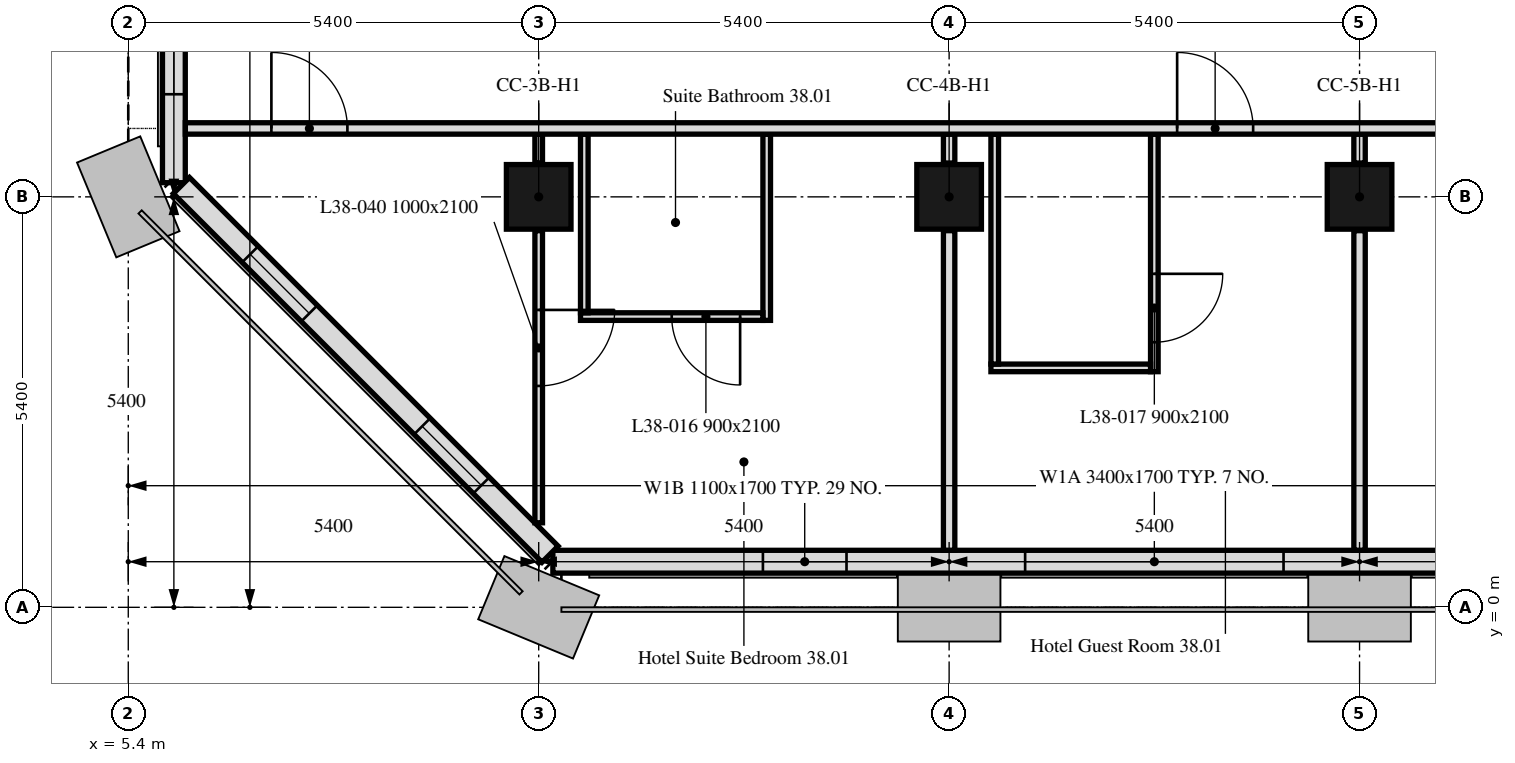
"""IFC4 building model, lengths in metres.
Left out: names, types, materials, properties, quantities, classifications, styles, units other than length and angle.
Written with IfcOpenShell. Run it as: python <this file> out.ifc"""

import sys

from ifc_helpers import new_model, si_unit, direction, frame, frame_2d, origin, origin_2d, place, context, subcontext, project, spatial, rectangle, extrude, element, fill, save


model = new_model("IFC4")
c1 = context("Model", 3, precision=1e-05, world=origin(), true_north=direction((0.0, 1.0)))
c2 = subcontext(c1, "Body", "Model", "MODEL_VIEW")
j1 = project(units=[si_unit("LENGTHUNIT", "METRE"), si_unit("PLANEANGLEUNIT", "RADIAN")], contexts=[c1])
p1 = place(None, origin())
s1 = spatial("IfcSite", under=j1, at=p1, CompositionType="ELEMENT")
p2 = place(p1, origin())
s2 = spatial("IfcBuilding", under=s1, at=p2, CompositionType="ELEMENT")
p3 = place(p2, frame((0.0, 0.0, 162.7)))
s3 = spatial("IfcBuildingStorey", under=s2, at=p3, CompositionType="ELEMENT", Elevation=162.7)
for number, where, z_axis, x_axis in (
    (1, (10.8, 5.4, 0.0), (0.0, 0.0, 1.0), (1.0, 0.0, 0.0)),
    (2, (16.2, 5.4, 0.0), (0.0, 0.0, 1.0), (1.0, 0.0, 0.0)),
    (3, (21.6, 5.4, 0.0), (0.0, 0.0, 1.0), (1.0, 0.0, 0.0)),
):
    element("IfcColumn", number, at=place(p3, frame(where, z_axis=z_axis, x_axis=x_axis)), inside=s3, PredefinedType="COLUMN", context=c2, shape_type="SweptSolid", body=[
        extrude(rectangle(XDim=0.85, YDim=0.85, at=origin_2d()), origin(), (0.0, 0.0, 1.0), 3.0),
    ])
p4 = place(p3, frame((10.986, 0.6, 0.0), z_axis=(0.0, 0.0, 1.0), x_axis=(1.0, 0.0, 0.0)))
e4 = element("IfcWall", 4, at=p4, inside=s3, PredefinedType="SOLIDWALL", context=c2, shape_type="SweptSolid", body=[
    extrude(rectangle(XDim=32.027, YDim=0.3, at=frame_2d((16.014, 0.0))), origin(), (0.0, 0.0, 1.0), 3.0),
])
p5 = place(p4, frame((2.764, 0.0, 0.9)))
e5 = element("IfcOpeningElement", 5, at=p5, cuts=e4, PredefinedType="OPENING", context=c2, shape_type="SweptSolid", body=[
    extrude(rectangle(XDim=1.1, YDim=1.7, at=frame_2d((0.55, 0.85))), frame((0.0, 0.16, 0.0), z_axis=(0.0, -1.0, 0.0), x_axis=(1.0, 0.0, 0.0)), (0.0, 0.0, 1.0), 0.32),
])
p6 = place(p4, frame((6.214, 0.0, 0.9)))
e6 = element("IfcOpeningElement", 6, at=p6, cuts=e4, PredefinedType="OPENING", context=c2, shape_type="SweptSolid", body=[
    extrude(rectangle(XDim=3.4, YDim=1.7, at=frame_2d((1.7, 0.85))), frame((0.0, 0.16, 0.0), z_axis=(0.0, -1.0, 0.0), x_axis=(1.0, 0.0, 0.0)), (0.0, 0.0, 1.0), 0.32),
])
p7 = place(p4, frame((13.564, 0.0, 0.9)))
e7 = element("IfcOpeningElement", 7, at=p7, cuts=e4, PredefinedType="OPENING", context=c2, shape_type="SweptSolid", body=[
    extrude(rectangle(XDim=1.1, YDim=1.7, at=frame_2d((0.55, 0.85))), frame((0.0, 0.16, 0.0), z_axis=(0.0, -1.0, 0.0), x_axis=(1.0, 0.0, 0.0)), (0.0, 0.0, 1.0), 0.32),
])
p8 = place(p4, frame((17.014, 0.0, 0.9)))
e8 = element("IfcOpeningElement", 8, at=p8, cuts=e4, PredefinedType="OPENING", context=c2, shape_type="SweptSolid", body=[
    extrude(rectangle(XDim=3.4, YDim=1.7, at=frame_2d((1.7, 0.85))), frame((0.0, 0.16, 0.0), z_axis=(0.0, -1.0, 0.0), x_axis=(1.0, 0.0, 0.0)), (0.0, 0.0, 1.0), 0.32),
])
p9 = place(p4, frame((24.364, 0.0, 0.9)))
e9 = element("IfcOpeningElement", 9, at=p9, cuts=e4, PredefinedType="OPENING", context=c2, shape_type="SweptSolid", body=[
    extrude(rectangle(XDim=1.1, YDim=1.7, at=frame_2d((0.55, 0.85))), frame((0.0, 0.16, 0.0), z_axis=(0.0, -1.0, 0.0), x_axis=(1.0, 0.0, 0.0)), (0.0, 0.0, 1.0), 0.32),
])
p10 = place(p4, frame((27.814, 0.0, 0.9)))
e10 = element("IfcOpeningElement", 10, at=p10, cuts=e4, PredefinedType="OPENING", context=c2, shape_type="SweptSolid", body=[
    extrude(rectangle(XDim=3.4, YDim=1.7, at=frame_2d((1.7, 0.85))), frame((0.0, 0.16, 0.0), z_axis=(0.0, -1.0, 0.0), x_axis=(1.0, 0.0, 0.0)), (0.0, 0.0, 1.0), 0.32),
])
p11 = place(p3, frame((6.0, 16.2, 0.0), z_axis=(0.0, 0.0, 1.0), x_axis=(0.0, -1.0, 0.0)))
e11 = element("IfcWall", 11, at=p11, inside=s3, PredefinedType="SOLIDWALL", context=c2, shape_type="SweptSolid", body=[
    extrude(rectangle(XDim=10.614, YDim=0.3, at=frame_2d((5.307, 0.0))), origin(), (0.0, 0.0, 1.0), 3.0),
])
p12 = place(p11, frame((1.35, 0.0, 0.9)))
e12 = element("IfcOpeningElement", 12, at=p12, cuts=e11, PredefinedType="OPENING", context=c2, shape_type="SweptSolid", body=[
    extrude(rectangle(XDim=1.1, YDim=1.7, at=frame_2d((0.55, 0.85))), frame((0.0, 0.16, 0.0), z_axis=(0.0, -1.0, 0.0), x_axis=(1.0, 0.0, 0.0)), (0.0, 0.0, 1.0), 0.32),
])
p13 = place(p11, frame((2.95, 0.0, 0.9)))
e13 = element("IfcOpeningElement", 13, at=p13, cuts=e11, PredefinedType="OPENING", context=c2, shape_type="SweptSolid", body=[
    extrude(rectangle(XDim=1.1, YDim=1.7, at=frame_2d((0.55, 0.85))), frame((0.0, 0.16, 0.0), z_axis=(0.0, -1.0, 0.0), x_axis=(1.0, 0.0, 0.0)), (0.0, 0.0, 1.0), 0.32),
])
p14 = place(p11, frame((6.75, 0.0, 0.9)))
e14 = element("IfcOpeningElement", 14, at=p14, cuts=e11, PredefinedType="OPENING", context=c2, shape_type="SweptSolid", body=[
    extrude(rectangle(XDim=1.1, YDim=1.7, at=frame_2d((0.55, 0.85))), frame((0.0, 0.16, 0.0), z_axis=(0.0, -1.0, 0.0), x_axis=(1.0, 0.0, 0.0)), (0.0, 0.0, 1.0), 0.32),
])
p15 = place(p11, frame((8.35, 0.0, 0.9)))
e15 = element("IfcOpeningElement", 15, at=p15, cuts=e11, PredefinedType="OPENING", context=c2, shape_type="SweptSolid", body=[
    extrude(rectangle(XDim=1.1, YDim=1.7, at=frame_2d((0.55, 0.85))), frame((0.0, 0.16, 0.0), z_axis=(0.0, -1.0, 0.0), x_axis=(1.0, 0.0, 0.0)), (0.0, 0.0, 1.0), 0.32),
])
p16 = place(p3, frame((6.099, 5.55, 0.0), z_axis=(0.0, 0.0, 1.0), x_axis=(0.707106781187, -0.707106781187, 0.0)))
e16 = element("IfcWall", 16, at=p16, inside=s3, PredefinedType="SOLIDWALL", context=c2, shape_type="SweptSolid", body=[
    extrude(rectangle(XDim=6.86, YDim=0.3, at=frame_2d((3.43, 0.0))), origin(), (0.0, 0.0, 1.0), 3.0),
])
p17 = place(p16, frame((1.28, 0.0, 0.9)))
e17 = element("IfcOpeningElement", 17, at=p17, cuts=e16, PredefinedType="OPENING", context=c2, shape_type="SweptSolid", body=[
    extrude(rectangle(XDim=1.1, YDim=1.7, at=frame_2d((0.55, 0.85))), frame((0.0, 0.16, 0.0), z_axis=(0.0, -1.0, 0.0), x_axis=(1.0, 0.0, 0.0)), (0.0, 0.0, 1.0), 0.32),
])
p18 = place(p16, frame((4.48, 0.0, 0.9)))
e18 = element("IfcOpeningElement", 18, at=p18, cuts=e16, PredefinedType="OPENING", context=c2, shape_type="SweptSolid", body=[
    extrude(rectangle(XDim=1.1, YDim=1.7, at=frame_2d((0.55, 0.85))), frame((0.0, 0.16, 0.0), z_axis=(0.0, -1.0, 0.0), x_axis=(1.0, 0.0, 0.0)), (0.0, 0.0, 1.0), 0.32),
])
p19 = place(p3, frame((16.2, 0.751, 0.0), z_axis=(0.0, 0.0, 1.0), x_axis=(0.0, 1.0, 0.0)))
e19 = element("IfcWall", 19, at=p19, inside=s3, PredefinedType="PARTITIONING", context=c2, shape_type="SweptSolid", body=[
    extrude(rectangle(XDim=4.204, YDim=0.15, at=frame_2d((2.102, 0.0))), origin(), (0.0, 0.0, 1.0), 2.4),
])
p20 = place(p3, frame((16.2, 5.845, 0.0), z_axis=(0.0, 0.0, 1.0), x_axis=(0.0, 1.0, 0.0)))
e20 = element("IfcWall", 20, at=p20, inside=s3, PredefinedType="PARTITIONING", context=c2, shape_type="SweptSolid", body=[
    extrude(rectangle(XDim=0.38, YDim=0.15, at=frame_2d((0.19, 0.0))), origin(), (0.0, 0.0, 1.0), 2.4),
])
p21 = place(p3, frame((13.8, 6.225, 0.0), z_axis=(0.0, 0.0, 1.0), x_axis=(0.0, -1.0, 0.0)))
e21 = element("IfcWall", 21, at=p21, inside=s3, PredefinedType="PARTITIONING", context=c2, shape_type="SweptSolid", body=[
    extrude(rectangle(XDim=2.45, YDim=0.1, at=frame_2d((1.225, 0.0))), origin(), (0.0, 0.0, 1.0), 3.0),
])
p22 = place(p3, frame((13.75, 3.825, 0.0), z_axis=(0.0, 0.0, 1.0), x_axis=(-1.0, 0.0, 0.0)))
e22 = element("IfcWall", 22, at=p22, inside=s3, PredefinedType="PARTITIONING", context=c2, shape_type="SweptSolid", body=[
    extrude(rectangle(XDim=2.4, YDim=0.1, at=frame_2d((1.2, 0.0))), origin(), (0.0, 0.0, 1.0), 3.0),
])
p23 = place(p22, frame((0.3, 0.0, 0.0)))
e23 = element("IfcOpeningElement", 23, at=p23, cuts=e22, PredefinedType="OPENING", context=c2, shape_type="SweptSolid", body=[
    extrude(rectangle(XDim=0.9, YDim=2.1, at=frame_2d((0.45, 1.05))), frame((0.0, 0.05, 0.0), z_axis=(0.0, -1.0, 0.0), x_axis=(1.0, 0.0, 0.0)), (0.0, 0.0, 1.0), 0.1),
])
p24 = place(p3, frame((11.4, 3.875, 0.0), z_axis=(0.0, 0.0, 1.0), x_axis=(0.0, 1.0, 0.0)))
e24 = element("IfcWall", 24, at=p24, inside=s3, PredefinedType="PARTITIONING", context=c2, shape_type="SweptSolid", body=[
    extrude(rectangle(XDim=2.35, YDim=0.1, at=frame_2d((1.175, 0.0))), origin(), (0.0, 0.0, 1.0), 3.0),
])
p25 = place(p3, frame((10.8, 6.225, 0.0), z_axis=(0.0, 0.0, 1.0), x_axis=(0.0, -1.0, 0.0)))
e25 = element("IfcWall", 25, at=p25, inside=s3, PredefinedType="PARTITIONING", context=c2, shape_type="SweptSolid", body=[
    extrude(rectangle(XDim=0.38, YDim=0.1, at=frame_2d((0.19, 0.0))), origin(), (0.0, 0.0, 1.0), 3.0),
])
p26 = place(p3, frame((10.8, 4.955, 0.0), z_axis=(0.0, 0.0, 1.0), x_axis=(0.0, -1.0, 0.0)))
e26 = element("IfcWall", 26, at=p26, inside=s3, PredefinedType="PARTITIONING", context=c2, shape_type="SweptSolid", body=[
    extrude(rectangle(XDim=3.843, YDim=0.1, at=frame_2d((1.921, 0.0))), origin(), (0.0, 0.0, 1.0), 3.0),
])
p27 = place(p26, frame((1.042, 0.0, 0.0)))
e27 = element("IfcOpeningElement", 27, at=p27, cuts=e26, PredefinedType="OPENING", context=c2, shape_type="SweptSolid", body=[
    extrude(rectangle(XDim=1.0, YDim=2.1, at=frame_2d((0.5, 1.05))), frame((0.0, 0.05, 0.0), z_axis=(0.0, -1.0, 0.0), x_axis=(1.0, 0.0, 0.0)), (0.0, 0.0, 1.0), 0.1),
])
p28 = place(p3, frame((21.6, 0.751, 0.0), z_axis=(0.0, 0.0, 1.0), x_axis=(0.0, 1.0, 0.0)))
e28 = element("IfcWall", 28, at=p28, inside=s3, PredefinedType="PARTITIONING", context=c2, shape_type="SweptSolid", body=[
    extrude(rectangle(XDim=4.204, YDim=0.15, at=frame_2d((2.102, 0.0))), origin(), (0.0, 0.0, 1.0), 2.4),
])
p29 = place(p3, frame((21.6, 5.845, 0.0), z_axis=(0.0, 0.0, 1.0), x_axis=(0.0, 1.0, 0.0)))
e29 = element("IfcWall", 29, at=p29, inside=s3, PredefinedType="PARTITIONING", context=c2, shape_type="SweptSolid", body=[
    extrude(rectangle(XDim=0.38, YDim=0.15, at=frame_2d((0.19, 0.0))), origin(), (0.0, 0.0, 1.0), 2.4),
])
p30 = place(p3, frame((18.9, 6.225, 0.0), z_axis=(0.0, 0.0, 1.0), x_axis=(0.0, -1.0, 0.0)))
e30 = element("IfcWall", 30, at=p30, inside=s3, PredefinedType="PARTITIONING", context=c2, shape_type="SweptSolid", body=[
    extrude(rectangle(XDim=3.125, YDim=0.1, at=frame_2d((1.562, 0.0))), origin(), (0.0, 0.0, 1.0), 3.0),
])
p31 = place(p30, frame((1.837, 0.0, 0.0)))
e31 = element("IfcOpeningElement", 31, at=p31, cuts=e30, PredefinedType="OPENING", context=c2, shape_type="SweptSolid", body=[
    extrude(rectangle(XDim=0.9, YDim=2.1, at=frame_2d((0.45, 1.05))), frame((0.0, 0.05, 0.0), z_axis=(0.0, -1.0, 0.0), x_axis=(1.0, 0.0, 0.0)), (0.0, 0.0, 1.0), 0.1),
])
p32 = place(p3, frame((18.85, 3.15, 0.0), z_axis=(0.0, 0.0, 1.0), x_axis=(-1.0, 0.0, 0.0)))
e32 = element("IfcWall", 32, at=p32, inside=s3, PredefinedType="PARTITIONING", context=c2, shape_type="SweptSolid", body=[
    extrude(rectangle(XDim=2.1, YDim=0.1, at=frame_2d((1.05, 0.0))), origin(), (0.0, 0.0, 1.0), 3.0),
])
p33 = place(p3, frame((16.8, 3.2, 0.0), z_axis=(0.0, 0.0, 1.0), x_axis=(0.0, 1.0, 0.0)))
e33 = element("IfcWall", 33, at=p33, inside=s3, PredefinedType="PARTITIONING", context=c2, shape_type="SweptSolid", body=[
    extrude(rectangle(XDim=3.025, YDim=0.1, at=frame_2d((1.513, 0.0))), origin(), (0.0, 0.0, 1.0), 3.0),
])
p34 = place(p3, frame((6.151, 6.3, 0.0), z_axis=(0.0, 0.0, 1.0), x_axis=(1.0, 0.0, 0.0)))
e34 = element("IfcWall", 34, at=p34, inside=s3, PredefinedType="PARTITIONING", context=c2, shape_type="SweptSolid", body=[
    extrude(rectangle(XDim=41.698, YDim=0.15, at=frame_2d((20.849, 0.0))), origin(), (0.0, 0.0, 1.0), 2.4),
])
p35 = place(p34, frame((1.132, 0.0, 0.0)))
e35 = element("IfcOpeningElement", 35, at=p35, cuts=e34, PredefinedType="OPENING", context=c2, shape_type="SweptSolid", body=[
    extrude(rectangle(XDim=1.0, YDim=2.1, at=frame_2d((0.5, 1.05))), frame((0.0, 0.075, 0.0), z_axis=(0.0, -1.0, 0.0), x_axis=(1.0, 0.0, 0.0)), (0.0, 0.0, 1.0), 0.15),
])
p36 = place(p34, frame((13.049, 0.0, 0.0)))
e36 = element("IfcOpeningElement", 36, at=p36, cuts=e34, PredefinedType="OPENING", context=c2, shape_type="SweptSolid", body=[
    extrude(rectangle(XDim=1.0, YDim=2.1, at=frame_2d((0.5, 1.05))), frame((0.0, 0.075, 0.0), z_axis=(0.0, -1.0, 0.0), x_axis=(1.0, 0.0, 0.0)), (0.0, 0.0, 1.0), 0.15),
])
p37 = place(p34, frame((17.649, 0.0, 0.0)))
e37 = element("IfcOpeningElement", 37, at=p37, cuts=e34, PredefinedType="OPENING", context=c2, shape_type="SweptSolid", body=[
    extrude(rectangle(XDim=1.0, YDim=2.1, at=frame_2d((0.5, 1.05))), frame((0.0, 0.075, 0.0), z_axis=(0.0, -1.0, 0.0), x_axis=(1.0, 0.0, 0.0)), (0.0, 0.0, 1.0), 0.15),
])
p38 = place(p34, frame((29.249, 0.0, 0.0)))
e38 = element("IfcOpeningElement", 38, at=p38, cuts=e34, PredefinedType="OPENING", context=c2, shape_type="SweptSolid", body=[
    extrude(rectangle(XDim=1.0, YDim=2.1, at=frame_2d((0.5, 1.05))), frame((0.0, 0.075, 0.0), z_axis=(0.0, -1.0, 0.0), x_axis=(1.0, 0.0, 0.0)), (0.0, 0.0, 1.0), 0.15),
])
p39 = place(p34, frame((37.599, 0.0, 0.0)))
e39 = element("IfcOpeningElement", 39, at=p39, cuts=e34, PredefinedType="OPENING", context=c2, shape_type="SweptSolid", body=[
    extrude(rectangle(XDim=1.0, YDim=2.1, at=frame_2d((0.5, 1.05))), frame((0.0, 0.075, 0.0), z_axis=(0.0, -1.0, 0.0), x_axis=(1.0, 0.0, 0.0)), (0.0, 0.0, 1.0), 0.15),
])
p40 = place(p5, origin())
e40 = element("IfcWindow", 40, at=p40, inside=s3, PartitioningType="SINGLE_PANEL", PredefinedType="WINDOW", context=c2, shape_type="SweptSolid", body=[
    extrude(rectangle(XDim=1.1, YDim=1.7, at=frame_2d((0.55, 0.85))), frame((0.0, 0.03, 0.0), z_axis=(0.0, -1.0, 0.0), x_axis=(1.0, 0.0, 0.0)), (0.0, 0.0, 1.0), 0.06),
])
fill(e5, e40)
p41 = place(p6, origin())
e41 = element("IfcWindow", 41, at=p41, inside=s3, PartitioningType="SINGLE_PANEL", PredefinedType="WINDOW", context=c2, shape_type="SweptSolid", body=[
    extrude(rectangle(XDim=3.4, YDim=1.7, at=frame_2d((1.7, 0.85))), frame((0.0, 0.03, 0.0), z_axis=(0.0, -1.0, 0.0), x_axis=(1.0, 0.0, 0.0)), (0.0, 0.0, 1.0), 0.06),
])
fill(e6, e41)
p42 = place(p15, origin())
e42 = element("IfcWindow", 42, at=p42, inside=s3, PartitioningType="SINGLE_PANEL", PredefinedType="WINDOW", context=c2, shape_type="SweptSolid", body=[
    extrude(rectangle(XDim=1.1, YDim=1.7, at=frame_2d((0.55, 0.85))), frame((0.0, 0.03, 0.0), z_axis=(0.0, -1.0, 0.0), x_axis=(1.0, 0.0, 0.0)), (0.0, 0.0, 1.0), 0.06),
])
fill(e15, e42)
p43 = place(p17, origin())
e43 = element("IfcWindow", 43, at=p43, inside=s3, PartitioningType="SINGLE_PANEL", PredefinedType="WINDOW", context=c2, shape_type="SweptSolid", body=[
    extrude(rectangle(XDim=1.1, YDim=1.7, at=frame_2d((0.55, 0.85))), frame((0.0, 0.03, 0.0), z_axis=(0.0, -1.0, 0.0), x_axis=(1.0, 0.0, 0.0)), (0.0, 0.0, 1.0), 0.06),
])
fill(e17, e43)
p44 = place(p18, origin())
e44 = element("IfcWindow", 44, at=p44, inside=s3, PartitioningType="SINGLE_PANEL", PredefinedType="WINDOW", context=c2, shape_type="SweptSolid", body=[
    extrude(rectangle(XDim=1.1, YDim=1.7, at=frame_2d((0.55, 0.85))), frame((0.0, 0.03, 0.0), z_axis=(0.0, -1.0, 0.0), x_axis=(1.0, 0.0, 0.0)), (0.0, 0.0, 1.0), 0.06),
])
fill(e18, e44)
p45 = place(p23, origin())
e45 = element("IfcDoor", 45, at=p45, inside=s3, OperationType="SINGLE_SWING_LEFT", PredefinedType="DOOR", context=c2, shape_type="SweptSolid", body=[
    extrude(rectangle(XDim=0.9, YDim=2.1, at=frame_2d((0.45, 1.05))), frame((0.0, 0.025, 0.0), z_axis=(0.0, -1.0, 0.0), x_axis=(1.0, 0.0, 0.0)), (0.0, 0.0, 1.0), 0.05),
])
fill(e23, e45)
p46 = place(p31, origin())
e46 = element("IfcDoor", 46, at=p46, inside=s3, OperationType="SINGLE_SWING_LEFT", PredefinedType="DOOR", context=c2, shape_type="SweptSolid", body=[
    extrude(rectangle(XDim=0.9, YDim=2.1, at=frame_2d((0.45, 1.05))), frame((0.0, 0.025, 0.0), z_axis=(0.0, -1.0, 0.0), x_axis=(1.0, 0.0, 0.0)), (0.0, 0.0, 1.0), 0.05),
])
fill(e31, e46)
p47 = place(p27, origin())
e47 = element("IfcDoor", 47, at=p47, inside=s3, OperationType="SINGLE_SWING_LEFT", PredefinedType="DOOR", context=c2, shape_type="SweptSolid", body=[
    extrude(rectangle(XDim=1.0, YDim=2.1, at=frame_2d((0.5, 1.05))), frame((0.0, 0.025, 0.0), z_axis=(0.0, -1.0, 0.0), x_axis=(1.0, 0.0, 0.0)), (0.0, 0.0, 1.0), 0.05),
])
fill(e27, e47)
p48 = place(p35, origin())
e48 = element("IfcDoor", 48, at=p48, inside=s3, OperationType="SINGLE_SWING_RIGHT", PredefinedType="DOOR", context=c2, shape_type="SweptSolid", body=[
    extrude(rectangle(XDim=1.0, YDim=2.1, at=frame_2d((0.5, 1.05))), frame((0.0, 0.025, 0.0), z_axis=(0.0, -1.0, 0.0), x_axis=(1.0, 0.0, 0.0)), (0.0, 0.0, 1.0), 0.05),
])
fill(e35, e48)
p49 = place(p36, origin())
e49 = element("IfcDoor", 49, at=p49, inside=s3, OperationType="SINGLE_SWING_RIGHT", PredefinedType="DOOR", context=c2, shape_type="SweptSolid", body=[
    extrude(rectangle(XDim=1.0, YDim=2.1, at=frame_2d((0.5, 1.05))), frame((0.0, 0.025, 0.0), z_axis=(0.0, -1.0, 0.0), x_axis=(1.0, 0.0, 0.0)), (0.0, 0.0, 1.0), 0.05),
])
fill(e36, e49)
save(model, sys.argv[1])
